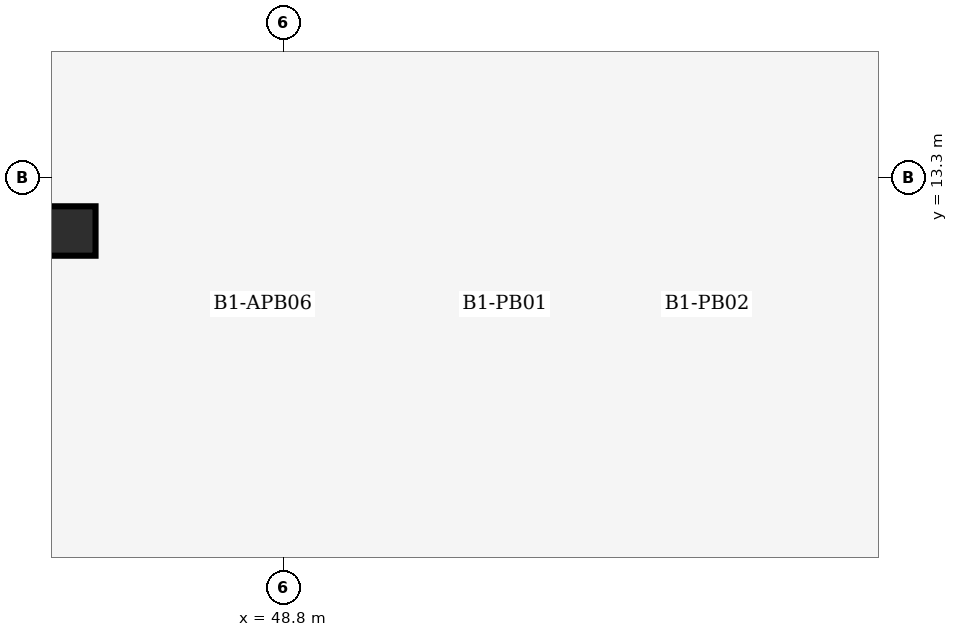
"""IFC4 building model, lengths in metres.
Left out: names, types, materials, properties, quantities, classifications, styles, units other than length and angle.
Written with IfcOpenShell. Run it as: python <this file> out.ifc"""

import sys

from ifc_helpers import new_model, si_unit, direction, frame, origin, origin_2d, place, context, subcontext, project, spatial, rectangle, extrude, element, save


model = new_model("IFC4")
c1 = context("Model", 3, precision=1e-05, world=origin(), true_north=direction((0.0, 1.0)))
c2 = subcontext(c1, "Body", "Model", "MODEL_VIEW")
j1 = project(units=[si_unit("LENGTHUNIT", "METRE"), si_unit("PLANEANGLEUNIT", "RADIAN")], contexts=[c1])
p1 = place(None, origin())
s1 = spatial("IfcSite", under=j1, at=p1, CompositionType="ELEMENT")
p2 = place(p1, origin())
s2 = spatial("IfcBuilding", under=s1, at=p2, CompositionType="ELEMENT")
p3 = place(p2, frame((0.0, 0.0, -4.8)))
s3 = spatial("IfcBuildingStorey", under=s2, at=p3, CompositionType="ELEMENT", Elevation=-4.8)
p4 = place(p3, frame((46.0, 12.6, 0.0), z_axis=(0.0, 0.0, 1.0), x_axis=(1.0, 0.0, 0.0)))
e1 = element("IfcColumn", 1, at=p4, inside=s3, PredefinedType="COLUMN", context=c2, shape_type="SweptSolid", body=[
    extrude(rectangle(XDim=0.65, YDim=0.65, at=origin_2d()), origin(), (0.0, 0.0, 1.0), 4.8),
])
save(model, sys.argv[1])
